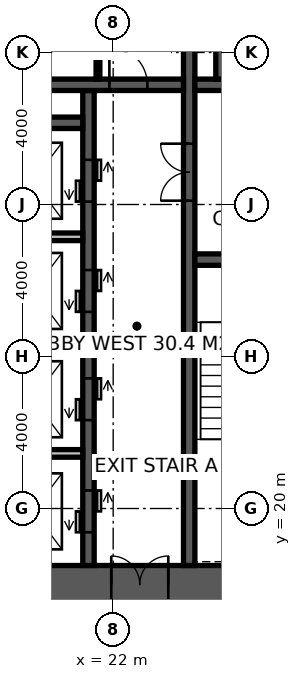
"""IFC4 building model, lengths in metres.
Left out: names, types, materials, properties, quantities, classifications, styles, units other than length and angle.
Written with IfcOpenShell. Run it as: python <this file> out.ifc"""

import sys

from ifc_helpers import new_model, si_unit, direction, frame, frame_2d, origin, place, context, subcontext, project, spatial, rectangle, extrude, element, fill, save


model = new_model("IFC4")
c1 = context("Model", 3, precision=1e-05, world=origin(), true_north=direction((0.0, 1.0)))
c2 = subcontext(c1, "Body", "Model", "MODEL_VIEW")
j1 = project(units=[si_unit("LENGTHUNIT", "METRE"), si_unit("PLANEANGLEUNIT", "RADIAN")], contexts=[c1])
p1 = place(None, origin())
s1 = spatial("IfcSite", under=j1, at=p1, CompositionType="ELEMENT")
p2 = place(p1, origin())
s2 = spatial("IfcBuilding", under=s1, at=p2, CompositionType="ELEMENT")
p3 = place(p2, frame((0.0, 0.0, 109.4)))
s3 = spatial("IfcBuildingStorey", under=s2, at=p3, CompositionType="ELEMENT", Elevation=109.4)
p4 = place(p3, frame((18.5, 18.0, -0.15), z_axis=(0.0, 0.0, 1.0), x_axis=(1.0, 0.0, 0.0)))
e1 = element("IfcWall", 1, at=p4, inside=s3, PredefinedType="SHEAR", context=c2, shape_type="SweptSolid", body=[
    extrude(rectangle(XDim=17.6, YDim=1.0, at=frame_2d((8.8, 0.0))), origin(), (0.0, 0.0, 1.0), 4.0),
])
p5 = place(p4, frame((3.45, 0.0, 0.15)))
e2 = element("IfcOpeningElement", 2, at=p5, cuts=e1, PredefinedType="OPENING", context=c2, shape_type="SweptSolid", body=[
    extrude(rectangle(XDim=1.5, YDim=2.4, at=frame_2d((0.75, 1.2))), frame((0.0, 0.51, 0.0), z_axis=(0.0, -1.0, 0.0), x_axis=(1.0, 0.0, 0.0)), (0.0, 0.0, 1.0), 1.02),
])
p6 = place(p3, frame((24.0, 18.5, -0.15), z_axis=(0.0, 0.0, 1.0), x_axis=(0.0, 1.0, 0.0)))
e3 = element("IfcWall", 3, at=p6, inside=s3, PredefinedType="SHEAR", context=c2, shape_type="SweptSolid", body=[
    extrude(rectangle(XDim=17.0, YDim=0.3, at=frame_2d((8.5, 0.0))), origin(), (0.0, 0.0, 1.0), 4.0),
])
p7 = place(p6, frame((9.6, 0.0, 0.15)))
e4 = element("IfcOpeningElement", 4, at=p7, cuts=e3, PredefinedType="OPENING", context=c2, shape_type="SweptSolid", body=[
    extrude(rectangle(XDim=1.5, YDim=2.4, at=frame_2d((0.75, 1.2))), frame((0.0, 0.16, 0.0), z_axis=(0.0, -1.0, 0.0), x_axis=(1.0, 0.0, 0.0)), (0.0, 0.0, 1.0), 0.32),
])
p8 = place(p3, frame((24.15, 26.55, -0.15), z_axis=(0.0, 0.0, 1.0), x_axis=(1.0, 0.0, 0.0)))
e5 = element("IfcWall", 5, at=p8, inside=s3, PredefinedType="SHEAR", context=c2, shape_type="SweptSolid", body=[
    extrude(rectangle(XDim=11.25, YDim=0.3, at=frame_2d((5.625, 0.0))), origin(), (0.0, 0.0, 1.0), 4.0),
])
p9 = place(p8, frame((9.25, 0.0, 0.15)))
e6 = element("IfcOpeningElement", 6, at=p9, cuts=e5, PredefinedType="OPENING", context=c2, shape_type="SweptSolid", body=[
    extrude(rectangle(XDim=1.0, YDim=2.2, at=frame_2d((0.5, 1.1))), frame((0.0, 0.16, 0.0), z_axis=(0.0, -1.0, 0.0), x_axis=(1.0, 0.0, 0.0)), (0.0, 0.0, 1.0), 0.32),
])
p10 = place(p8, frame((4.9, 0.0, 0.15)))
e7 = element("IfcOpeningElement", 7, at=p10, cuts=e5, PredefinedType="OPENING", context=c2, shape_type="SweptSolid", body=[
    extrude(rectangle(XDim=1.5, YDim=2.4, at=frame_2d((0.75, 1.2))), frame((0.0, 0.16, 0.0), z_axis=(0.0, -1.0, 0.0), x_axis=(1.0, 0.0, 0.0)), (0.0, 0.0, 1.0), 0.32),
])
p11 = place(p3, frame((24.15, 31.15, -0.15), z_axis=(0.0, 0.0, 1.0), x_axis=(1.0, 0.0, 0.0)))
e8 = element("IfcWall", 8, at=p11, inside=s3, PredefinedType="SHEAR", context=c2, shape_type="SweptSolid", body=[
    extrude(rectangle(XDim=11.25, YDim=0.3, at=frame_2d((5.625, 0.0))), origin(), (0.0, 0.0, 1.0), 4.0),
])
p12 = place(p11, frame((7.25, 0.0, 0.15)))
e9 = element("IfcOpeningElement", 9, at=p12, cuts=e8, PredefinedType="OPENING", context=c2, shape_type="SweptSolid", body=[
    extrude(rectangle(XDim=1.4, YDim=2.4, at=frame_2d((0.7, 1.2))), frame((0.0, 0.16, 0.0), z_axis=(0.0, -1.0, 0.0), x_axis=(1.0, 0.0, 0.0)), (0.0, 0.0, 1.0), 0.32),
])
p13 = place(p3, frame((21.35, 18.5, -0.15), z_axis=(0.0, 0.0, 1.0), x_axis=(0.0, 1.0, 0.0)))
e10 = element("IfcWall", 10, at=p13, inside=s3, PredefinedType="SHEAR", context=c2, shape_type="SweptSolid", body=[
    extrude(rectangle(XDim=12.5, YDim=0.3, at=frame_2d((6.25, 0.0))), origin(), (0.0, 0.0, 1.0), 4.0),
])
p14 = place(p13, frame((0.875, 0.0, 0.15)))
e11 = element("IfcOpeningElement", 11, at=p14, cuts=e10, PredefinedType="OPENING", context=c2, shape_type="SweptSolid", body=[
    extrude(rectangle(XDim=1.1, YDim=2.2, at=frame_2d((0.55, 1.1))), frame((0.0, 0.16, 0.0), z_axis=(0.0, -1.0, 0.0), x_axis=(1.0, 0.0, 0.0)), (0.0, 0.0, 1.0), 0.32),
])
p15 = place(p13, frame((3.825, 0.0, 0.15)))
e12 = element("IfcOpeningElement", 12, at=p15, cuts=e10, PredefinedType="OPENING", context=c2, shape_type="SweptSolid", body=[
    extrude(rectangle(XDim=1.1, YDim=2.2, at=frame_2d((0.55, 1.1))), frame((0.0, 0.16, 0.0), z_axis=(0.0, -1.0, 0.0), x_axis=(1.0, 0.0, 0.0)), (0.0, 0.0, 1.0), 0.32),
])
p16 = place(p13, frame((6.675, 0.0, 0.15)))
e13 = element("IfcOpeningElement", 13, at=p16, cuts=e10, PredefinedType="OPENING", context=c2, shape_type="SweptSolid", body=[
    extrude(rectangle(XDim=1.1, YDim=2.2, at=frame_2d((0.55, 1.1))), frame((0.0, 0.16, 0.0), z_axis=(0.0, -1.0, 0.0), x_axis=(1.0, 0.0, 0.0)), (0.0, 0.0, 1.0), 0.32),
])
p17 = place(p13, frame((9.575, 0.0, 0.15)))
e14 = element("IfcOpeningElement", 14, at=p17, cuts=e10, PredefinedType="OPENING", context=c2, shape_type="SweptSolid", body=[
    extrude(rectangle(XDim=1.1, YDim=2.2, at=frame_2d((0.55, 1.1))), frame((0.0, 0.16, 0.0), z_axis=(0.0, -1.0, 0.0), x_axis=(1.0, 0.0, 0.0)), (0.0, 0.0, 1.0), 0.32),
])
p18 = place(p3, frame((18.5, 31.15, -0.15), z_axis=(0.0, 0.0, 1.0), x_axis=(1.0, 0.0, 0.0)))
e15 = element("IfcWall", 15, at=p18, inside=s3, PredefinedType="SHEAR", context=c2, shape_type="SweptSolid", body=[
    extrude(rectangle(XDim=5.35, YDim=0.3, at=frame_2d((2.675, 0.0))), origin(), (0.0, 0.0, 1.0), 4.0),
])
p19 = place(p18, frame((3.4, 0.0, 0.15)))
e16 = element("IfcOpeningElement", 16, at=p19, cuts=e15, PredefinedType="OPENING", context=c2, shape_type="SweptSolid", body=[
    extrude(rectangle(XDim=1.0, YDim=2.2, at=frame_2d((0.5, 1.1))), frame((0.0, 0.16, 0.0), z_axis=(0.0, -1.0, 0.0), x_axis=(1.0, 0.0, 0.0)), (0.0, 0.0, 1.0), 0.32),
])
p20 = place(p3, frame((18.5, 30.15, -0.15), z_axis=(0.0, 0.0, 1.0), x_axis=(1.0, 0.0, 0.0)))
e17 = element("IfcWall", 17, at=p20, inside=s3, PredefinedType="SHEAR", context=c2, shape_type="SweptSolid", body=[
    extrude(rectangle(XDim=2.7, YDim=0.3, at=frame_2d((1.35, 0.0))), origin(), (0.0, 0.0, 1.0), 4.0),
])
p21 = place(p3, frame((24.85, 31.3, -0.15), z_axis=(0.0, 0.0, 1.0), x_axis=(0.0, 1.0, 0.0)))
e18 = element("IfcWall", 18, at=p21, inside=s3, PredefinedType="SHEAR", context=c2, shape_type="SweptSolid", body=[
    extrude(rectangle(XDim=4.2, YDim=0.3, at=frame_2d((2.1, 0.0))), origin(), (0.0, 0.0, 1.0), 4.0),
])
for number, where, z_axis, x_axis in (
    (19, (18.5, 21.45, -0.15), (0.0, 0.0, 1.0), (1.0, 0.0, 0.0)),
    (20, (18.5, 24.3, -0.15), (0.0, 0.0, 1.0), (1.0, 0.0, 0.0)),
    (21, (18.5, 27.15, -0.15), (0.0, 0.0, 1.0), (1.0, 0.0, 0.0)),
):
    element("IfcWall", number, at=place(p3, frame(where, z_axis=z_axis, x_axis=x_axis)), inside=s3, PredefinedType="SOLIDWALL", context=c2, shape_type="SweptSolid", body=[
        extrude(rectangle(XDim=2.7, YDim=0.2, at=frame_2d((1.35, 0.0))), origin(), (0.0, 0.0, 1.0), 4.0),
    ])
p22 = place(p3, frame((21.6, 31.3, 0.0), z_axis=(0.0, 0.0, 1.0), x_axis=(0.0, 1.0, 0.0)))
e22 = element("IfcWall", 22, at=p22, inside=s3, PredefinedType="PARTITIONING", context=c2, shape_type="SweptSolid", body=[
    extrude(rectangle(XDim=4.2, YDim=0.1, at=frame_2d((2.1, 0.0))), origin(), (0.0, 0.0, 1.0), 3.85),
])
p23 = place(p22, frame((1.55, 0.0, 0.0)))
e23 = element("IfcOpeningElement", 23, at=p23, cuts=e22, PredefinedType="OPENING", context=c2, shape_type="SweptSolid", body=[
    extrude(rectangle(XDim=1.0, YDim=2.2, at=frame_2d((0.5, 1.1))), frame((0.0, 0.06, 0.0), z_axis=(0.0, -1.0, 0.0), x_axis=(1.0, 0.0, 0.0)), (0.0, 0.0, 1.0), 0.12),
])
p24 = place(p7, origin())
e24 = element("IfcDoor", 24, at=p24, inside=s3, OperationType="DOUBLE_DOOR_DOUBLE_SWING", PredefinedType="DOOR", context=c2, shape_type="SweptSolid", body=[
    extrude(rectangle(XDim=1.5, YDim=2.4, at=frame_2d((0.75, 1.2))), frame((0.0, 0.025, 0.0), z_axis=(0.0, -1.0, 0.0), x_axis=(1.0, 0.0, 0.0)), (0.0, 0.0, 1.0), 0.05),
])
fill(e4, e24)
p25 = place(p19, origin())
e25 = element("IfcDoor", 25, at=p25, inside=s3, OperationType="SINGLE_SWING_LEFT", PredefinedType="DOOR", context=c2, shape_type="SweptSolid", body=[
    extrude(rectangle(XDim=1.0, YDim=2.2, at=frame_2d((0.5, 1.1))), frame((0.0, 0.025, 0.0), z_axis=(0.0, -1.0, 0.0), x_axis=(1.0, 0.0, 0.0)), (0.0, 0.0, 1.0), 0.05),
])
fill(e16, e25)
p26 = place(p5, origin())
e26 = element("IfcDoor", 26, at=p26, inside=s3, OperationType="DOUBLE_DOOR_DOUBLE_SWING", PredefinedType="DOOR", context=c2, shape_type="SweptSolid", body=[
    extrude(rectangle(XDim=1.5, YDim=2.4, at=frame_2d((0.75, 1.2))), frame((0.0, 0.025, 0.0), z_axis=(0.0, -1.0, 0.0), x_axis=(1.0, 0.0, 0.0)), (0.0, 0.0, 1.0), 0.05),
])
fill(e2, e26)
p27 = place(p14, origin())
e27 = element("IfcDoor", 27, at=p27, inside=s3, OperationType="DOUBLE_DOOR_SLIDING", PredefinedType="DOOR", context=c2, shape_type="SweptSolid", body=[
    extrude(rectangle(XDim=1.1, YDim=2.2, at=frame_2d((0.55, 1.1))), frame((0.0, 0.025, 0.0), z_axis=(0.0, -1.0, 0.0), x_axis=(1.0, 0.0, 0.0)), (0.0, 0.0, 1.0), 0.05),
])
fill(e11, e27)
p28 = place(p15, origin())
e28 = element("IfcDoor", 28, at=p28, inside=s3, OperationType="DOUBLE_DOOR_SLIDING", PredefinedType="DOOR", context=c2, shape_type="SweptSolid", body=[
    extrude(rectangle(XDim=1.1, YDim=2.2, at=frame_2d((0.55, 1.1))), frame((0.0, 0.025, 0.0), z_axis=(0.0, -1.0, 0.0), x_axis=(1.0, 0.0, 0.0)), (0.0, 0.0, 1.0), 0.05),
])
fill(e12, e28)
p29 = place(p16, origin())
e29 = element("IfcDoor", 29, at=p29, inside=s3, OperationType="DOUBLE_DOOR_SLIDING", PredefinedType="DOOR", context=c2, shape_type="SweptSolid", body=[
    extrude(rectangle(XDim=1.1, YDim=2.2, at=frame_2d((0.55, 1.1))), frame((0.0, 0.025, 0.0), z_axis=(0.0, -1.0, 0.0), x_axis=(1.0, 0.0, 0.0)), (0.0, 0.0, 1.0), 0.05),
])
fill(e13, e29)
p30 = place(p17, origin())
e30 = element("IfcDoor", 30, at=p30, inside=s3, OperationType="DOUBLE_DOOR_SLIDING", PredefinedType="DOOR", context=c2, shape_type="SweptSolid", body=[
    extrude(rectangle(XDim=1.1, YDim=2.2, at=frame_2d((0.55, 1.1))), frame((0.0, 0.025, 0.0), z_axis=(0.0, -1.0, 0.0), x_axis=(1.0, 0.0, 0.0)), (0.0, 0.0, 1.0), 0.05),
])
fill(e14, e30)
save(model, sys.argv[1])
